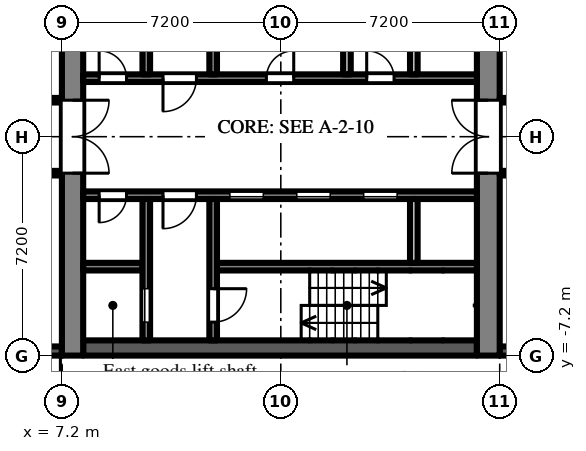
"""IFC4 building model, lengths in metres.
Left out: names, types, materials, properties, quantities, classifications, styles, units other than length and angle.
Written with IfcOpenShell. Run it as: python <this file> out.ifc"""

import sys

from ifc_helpers import new_model, si_unit, direction, frame, frame_2d, origin, place, context, subcontext, project, spatial, rectangle, extrude, element, fill, save


model = new_model("IFC4")
c1 = context("Model", 3, precision=1e-05, world=origin(), true_north=direction((0.0, 1.0)))
c2 = subcontext(c1, "Body", "Model", "MODEL_VIEW")
j1 = project(units=[si_unit("LENGTHUNIT", "METRE"), si_unit("PLANEANGLEUNIT", "RADIAN")], contexts=[c1])
p1 = place(None, origin())
s1 = spatial("IfcSite", under=j1, at=p1, CompositionType="ELEMENT")
p2 = place(p1, origin())
s2 = spatial("IfcBuilding", under=s1, at=p2, CompositionType="ELEMENT")
p3 = place(p2, frame((0.0, 0.0, 59.7)))
s3 = spatial("IfcBuildingStorey", under=s2, at=p3, CompositionType="ELEMENT", Elevation=59.7)
p4 = place(p3, frame((21.6, -7.05, 0.0), z_axis=(0.0, 0.0, 1.0), x_axis=(1.0, 0.0, 0.0)))
e1 = element("IfcWall", 1, at=p4, inside=s3, PredefinedType="SOLIDWALL", context=c2, shape_type="SweptSolid", body=[
    extrude(rectangle(XDim=2.7, YDim=0.3, at=frame_2d((1.35, 0.0))), origin(), (0.0, 0.0, 1.0), 2.1),
])
p5 = place(p4, frame((0.75, 0.0, 0.2)))
e2 = element("IfcOpeningElement", 2, at=p5, cuts=e1, PredefinedType="OPENING", context=c2, shape_type="SweptSolid", body=[
    extrude(rectangle(XDim=1.2, YDim=1.85, at=frame_2d((0.6, 0.925))), frame((0.0, 0.16, 0.0), z_axis=(0.0, -1.0, 0.0), x_axis=(1.0, 0.0, 0.0)), (0.0, 0.0, 1.0), 0.32),
])
p6 = place(p3, frame((4.2, -7.05, 0.0), z_axis=(0.0, 0.0, 1.0), x_axis=(1.0, 0.0, 0.0)))
e3 = element("IfcWall", 3, at=p6, inside=s3, PredefinedType="SOLIDWALL", context=c2, shape_type="SweptSolid", body=[
    extrude(rectangle(XDim=3.0, YDim=0.3, at=frame_2d((1.5, 0.0))), origin(), (0.0, 0.0, 1.0), 2.55),
])
p7 = place(p3, frame((7.55, -7.2, 0.0), z_axis=(0.0, 0.0, 1.0), x_axis=(0.0, 1.0, 0.0)))
e4 = element("IfcWall", 4, at=p7, inside=s3, PredefinedType="SHEAR", context=c2, shape_type="SweptSolid", body=[
    extrude(rectangle(XDim=14.4, YDim=0.7, at=frame_2d((7.2, 0.0))), origin(), (0.0, 0.0, 1.0), 2.55),
])
p8 = place(p7, frame((6.0, 0.0, 0.0)))
e5 = element("IfcOpeningElement", 5, at=p8, cuts=e4, PredefinedType="OPENING", context=c2, shape_type="SweptSolid", body=[
    extrude(rectangle(XDim=2.4, YDim=2.2, at=frame_2d((1.2, 1.1))), frame((0.0, 0.36, 0.0), z_axis=(0.0, -1.0, 0.0), x_axis=(1.0, 0.0, 0.0)), (0.0, 0.0, 1.0), 0.72),
])
p9 = place(p3, frame((21.225, -7.2, 0.0), z_axis=(0.0, 0.0, 1.0), x_axis=(0.0, 1.0, 0.0)))
e6 = element("IfcWall", 6, at=p9, inside=s3, PredefinedType="SHEAR", context=c2, shape_type="SweptSolid", body=[
    extrude(rectangle(XDim=14.4, YDim=0.75, at=frame_2d((7.2, 0.0))), origin(), (0.0, 0.0, 1.0), 2.55),
])
p10 = place(p9, frame((6.0, 0.0, 0.0)))
e7 = element("IfcOpeningElement", 7, at=p10, cuts=e6, PredefinedType="OPENING", context=c2, shape_type="SweptSolid", body=[
    extrude(rectangle(XDim=2.4, YDim=2.2, at=frame_2d((1.2, 1.1))), frame((0.0, 0.385, 0.0), z_axis=(0.0, -1.0, 0.0), x_axis=(1.0, 0.0, 0.0)), (0.0, 0.0, 1.0), 0.77),
])
p11 = place(p3, frame((7.9, 1.925, 0.0), z_axis=(0.0, 0.0, 1.0), x_axis=(1.0, 0.0, 0.0)))
e8 = element("IfcWall", 8, at=p11, inside=s3, PredefinedType="SHEAR", context=c2, shape_type="SweptSolid", body=[
    extrude(rectangle(XDim=12.95, YDim=0.25, at=frame_2d((6.475, 0.0))), origin(), (0.0, 0.0, 1.0), 2.55),
])
p12 = place(p11, frame((0.525, 0.0, 0.0)))
e9 = element("IfcOpeningElement", 9, at=p12, cuts=e8, PredefinedType="OPENING", context=c2, shape_type="SweptSolid", body=[
    extrude(rectangle(XDim=0.9, YDim=2.1, at=frame_2d((0.45, 1.05))), frame((0.0, 0.135, 0.0), z_axis=(0.0, -1.0, 0.0), x_axis=(1.0, 0.0, 0.0)), (0.0, 0.0, 1.0), 0.27),
])
p13 = place(p11, frame((2.625, 0.0, 0.0)))
e10 = element("IfcOpeningElement", 10, at=p13, cuts=e8, PredefinedType="OPENING", context=c2, shape_type="SweptSolid", body=[
    extrude(rectangle(XDim=1.1, YDim=2.1, at=frame_2d((0.55, 1.05))), frame((0.0, 0.135, 0.0), z_axis=(0.0, -1.0, 0.0), x_axis=(1.0, 0.0, 0.0)), (0.0, 0.0, 1.0), 0.27),
])
p14 = place(p11, frame((6.025, 0.0, 0.0)))
e11 = element("IfcOpeningElement", 11, at=p14, cuts=e8, PredefinedType="OPENING", context=c2, shape_type="SweptSolid", body=[
    extrude(rectangle(XDim=0.9, YDim=2.1, at=frame_2d((0.45, 1.05))), frame((0.0, 0.135, 0.0), z_axis=(0.0, -1.0, 0.0), x_axis=(1.0, 0.0, 0.0)), (0.0, 0.0, 1.0), 0.27),
])
p15 = place(p11, frame((9.325, 0.0, 0.0)))
e12 = element("IfcOpeningElement", 12, at=p15, cuts=e8, PredefinedType="OPENING", context=c2, shape_type="SweptSolid", body=[
    extrude(rectangle(XDim=0.9, YDim=2.1, at=frame_2d((0.45, 1.05))), frame((0.0, 0.135, 0.0), z_axis=(0.0, -1.0, 0.0), x_axis=(1.0, 0.0, 0.0)), (0.0, 0.0, 1.0), 0.27),
])
p16 = place(p3, frame((9.975, 2.05, 0.0), z_axis=(0.0, 0.0, 1.0), x_axis=(0.0, 1.0, 0.0)))
e13 = element("IfcWall", 13, at=p16, inside=s3, PredefinedType="SHEAR", context=c2, shape_type="SweptSolid", body=[
    extrude(rectangle(XDim=4.65, YDim=0.25, at=frame_2d((2.325, 0.0))), origin(), (0.0, 0.0, 1.0), 2.55),
])
p17 = place(p16, frame((2.95, 0.0, 0.0)))
e14 = element("IfcOpeningElement", 14, at=p17, cuts=e13, PredefinedType="OPENING", context=c2, shape_type="SweptSolid", body=[
    extrude(rectangle(XDim=1.1, YDim=2.1, at=frame_2d((0.55, 1.05))), frame((0.0, 0.135, 0.0), z_axis=(0.0, -1.0, 0.0), x_axis=(1.0, 0.0, 0.0)), (0.0, 0.0, 1.0), 0.27),
])
p18 = place(p3, frame((12.175, 2.05, 0.0), z_axis=(0.0, 0.0, 1.0), x_axis=(0.0, 1.0, 0.0)))
e15 = element("IfcWall", 15, at=p18, inside=s3, PredefinedType="SHEAR", context=c2, shape_type="SweptSolid", body=[
    extrude(rectangle(XDim=4.65, YDim=0.25, at=frame_2d((2.325, 0.0))), origin(), (0.0, 0.0, 1.0), 2.55),
])
p19 = place(p18, frame((2.95, 0.0, 0.0)))
e16 = element("IfcOpeningElement", 16, at=p19, cuts=e15, PredefinedType="OPENING", context=c2, shape_type="SweptSolid", body=[
    extrude(rectangle(XDim=1.1, YDim=2.1, at=frame_2d((0.55, 1.05))), frame((0.0, 0.135, 0.0), z_axis=(0.0, -1.0, 0.0), x_axis=(1.0, 0.0, 0.0)), (0.0, 0.0, 1.0), 0.27),
])
for number, where, z_axis, x_axis in (
    (17, (16.575, 2.05, 0.0), (0.0, 0.0, 1.0), (0.0, 1.0, 0.0)),
    (18, (18.775, 2.05, 0.0), (0.0, 0.0, 1.0), (0.0, 1.0, 0.0)),
):
    element("IfcWall", number, at=place(p3, frame(where, z_axis=z_axis, x_axis=x_axis)), inside=s3, PredefinedType="PARTITIONING", context=c2, shape_type="SweptSolid", body=[
        extrude(rectangle(XDim=2.1, YDim=0.25, at=frame_2d((1.05, 0.0))), origin(), (0.0, 0.0, 1.0), 2.55),
    ])
p20 = place(p3, frame((7.9, -6.95, 0.0), z_axis=(0.0, 0.0, 1.0), x_axis=(1.0, 0.0, 0.0)))
e19 = element("IfcWall", 19, at=p20, inside=s3, PredefinedType="SHEAR", context=c2, shape_type="SweptSolid", body=[
    extrude(rectangle(XDim=12.95, YDim=0.5, at=frame_2d((6.475, 0.0))), origin(), (0.0, 0.0, 1.0), 2.55),
])
p21 = place(p3, frame((7.9, -1.925, 0.0), z_axis=(0.0, 0.0, 1.0), x_axis=(1.0, 0.0, 0.0)))
e20 = element("IfcWall", 20, at=p21, inside=s3, PredefinedType="SHEAR", context=c2, shape_type="SweptSolid", body=[
    extrude(rectangle(XDim=12.95, YDim=0.25, at=frame_2d((6.475, 0.0))), origin(), (0.0, 0.0, 1.0), 2.55),
])
p22 = place(p21, frame((4.825, 0.0, 0.0)))
e21 = element("IfcOpeningElement", 21, at=p22, cuts=e20, PredefinedType="OPENING", context=c2, shape_type="SweptSolid", body=[
    extrude(rectangle(XDim=1.1, YDim=2.1, at=frame_2d((0.55, 1.05))), frame((0.0, 0.135, 0.0), z_axis=(0.0, -1.0, 0.0), x_axis=(1.0, 0.0, 0.0)), (0.0, 0.0, 1.0), 0.27),
])
p23 = place(p21, frame((7.025, 0.0, 0.0)))
e22 = element("IfcOpeningElement", 22, at=p23, cuts=e20, PredefinedType="OPENING", context=c2, shape_type="SweptSolid", body=[
    extrude(rectangle(XDim=1.1, YDim=2.1, at=frame_2d((0.55, 1.05))), frame((0.0, 0.135, 0.0), z_axis=(0.0, -1.0, 0.0), x_axis=(1.0, 0.0, 0.0)), (0.0, 0.0, 1.0), 0.27),
])
p24 = place(p21, frame((9.225, 0.0, 0.0)))
e23 = element("IfcOpeningElement", 23, at=p24, cuts=e20, PredefinedType="OPENING", context=c2, shape_type="SweptSolid", body=[
    extrude(rectangle(XDim=1.1, YDim=2.1, at=frame_2d((0.55, 1.05))), frame((0.0, 0.135, 0.0), z_axis=(0.0, -1.0, 0.0), x_axis=(1.0, 0.0, 0.0)), (0.0, 0.0, 1.0), 0.27),
])
p25 = place(p21, frame((0.525, 0.0, 0.0)))
e24 = element("IfcOpeningElement", 24, at=p25, cuts=e20, PredefinedType="OPENING", context=c2, shape_type="SweptSolid", body=[
    extrude(rectangle(XDim=0.9, YDim=2.1, at=frame_2d((0.45, 1.05))), frame((0.0, 0.135, 0.0), z_axis=(0.0, -1.0, 0.0), x_axis=(1.0, 0.0, 0.0)), (0.0, 0.0, 1.0), 0.27),
])
p26 = place(p21, frame((2.625, 0.0, 0.0)))
e25 = element("IfcOpeningElement", 25, at=p26, cuts=e20, PredefinedType="OPENING", context=c2, shape_type="SweptSolid", body=[
    extrude(rectangle(XDim=1.1, YDim=2.1, at=frame_2d((0.55, 1.05))), frame((0.0, 0.135, 0.0), z_axis=(0.0, -1.0, 0.0), x_axis=(1.0, 0.0, 0.0)), (0.0, 0.0, 1.0), 0.27),
])
p27 = place(p3, frame((7.9, -4.275, 0.0), z_axis=(0.0, 0.0, 1.0), x_axis=(1.0, 0.0, 0.0)))
e26 = element("IfcWall", 26, at=p27, inside=s3, PredefinedType="SHEAR", context=c2, shape_type="SweptSolid", body=[
    extrude(rectangle(XDim=1.95, YDim=0.25, at=frame_2d((0.975, 0.0))), origin(), (0.0, 0.0, 1.0), 2.55),
])
p28 = place(p3, frame((12.3, -4.275, 0.0), z_axis=(0.0, 0.0, 1.0), x_axis=(1.0, 0.0, 0.0)))
e27 = element("IfcWall", 27, at=p28, inside=s3, PredefinedType="SHEAR", context=c2, shape_type="SweptSolid", body=[
    extrude(rectangle(XDim=8.55, YDim=0.25, at=frame_2d((4.275, 0.0))), origin(), (0.0, 0.0, 1.0), 2.55),
])
p29 = place(p3, frame((9.975, -2.05, 0.0), z_axis=(0.0, 0.0, 1.0), x_axis=(0.0, -1.0, 0.0)))
e28 = element("IfcWall", 28, at=p29, inside=s3, PredefinedType="SHEAR", context=c2, shape_type="SweptSolid", body=[
    extrude(rectangle(XDim=4.65, YDim=0.25, at=frame_2d((2.325, 0.0))), origin(), (0.0, 0.0, 1.0), 2.55),
])
p30 = place(p29, frame((2.95, 0.0, 0.0)))
e29 = element("IfcOpeningElement", 29, at=p30, cuts=e28, PredefinedType="OPENING", context=c2, shape_type="SweptSolid", body=[
    extrude(rectangle(XDim=1.1, YDim=2.1, at=frame_2d((0.55, 1.05))), frame((0.0, 0.135, 0.0), z_axis=(0.0, -1.0, 0.0), x_axis=(1.0, 0.0, 0.0)), (0.0, 0.0, 1.0), 0.27),
])
p31 = place(p3, frame((12.175, -2.05, 0.0), z_axis=(0.0, 0.0, 1.0), x_axis=(0.0, -1.0, 0.0)))
e30 = element("IfcWall", 30, at=p31, inside=s3, PredefinedType="SHEAR", context=c2, shape_type="SweptSolid", body=[
    extrude(rectangle(XDim=4.65, YDim=0.25, at=frame_2d((2.325, 0.0))), origin(), (0.0, 0.0, 1.0), 2.55),
])
p32 = place(p31, frame((2.95, 0.0, 0.0)))
e31 = element("IfcOpeningElement", 31, at=p32, cuts=e30, PredefinedType="OPENING", context=c2, shape_type="SweptSolid", body=[
    extrude(rectangle(XDim=1.1, YDim=2.1, at=frame_2d((0.55, 1.05))), frame((0.0, 0.135, 0.0), z_axis=(0.0, -1.0, 0.0), x_axis=(1.0, 0.0, 0.0)), (0.0, 0.0, 1.0), 0.27),
])
p33 = place(p3, frame((18.775, -2.05, 0.0), z_axis=(0.0, 0.0, 1.0), x_axis=(0.0, -1.0, 0.0)))
e32 = element("IfcWall", 32, at=p33, inside=s3, PredefinedType="PARTITIONING", context=c2, shape_type="SweptSolid", body=[
    extrude(rectangle(XDim=2.1, YDim=0.25, at=frame_2d((1.05, 0.0))), origin(), (0.0, 0.0, 1.0), 2.55),
])
p34 = place(p3, frame((1.275, -1.2, 0.0), z_axis=(0.0, 0.0, 1.0), x_axis=(1.0, 0.0, 0.0)))
e33 = element("IfcWall", 33, at=p34, inside=s3, PredefinedType="PARTITIONING", context=c2, shape_type="SweptSolid", body=[
    extrude(rectangle(XDim=5.925, YDim=0.15, at=frame_2d((2.962, 0.0))), origin(), (0.0, 0.0, 1.0), 2.55),
])
p35 = place(p34, frame((3.075, 0.0, 0.0)))
e34 = element("IfcOpeningElement", 34, at=p35, cuts=e33, PredefinedType="OPENING", context=c2, shape_type="SweptSolid", body=[
    extrude(rectangle(XDim=0.9, YDim=2.1, at=frame_2d((0.45, 1.05))), frame((0.0, 0.085, 0.0), z_axis=(0.0, -1.0, 0.0), x_axis=(1.0, 0.0, 0.0)), (0.0, 0.0, 1.0), 0.17),
])
p36 = place(p3, frame((1.275, 1.2, 0.0), z_axis=(0.0, 0.0, 1.0), x_axis=(1.0, 0.0, 0.0)))
e35 = element("IfcWall", 35, at=p36, inside=s3, PredefinedType="PARTITIONING", context=c2, shape_type="SweptSolid", body=[
    extrude(rectangle(XDim=5.925, YDim=0.15, at=frame_2d((2.962, 0.0))), origin(), (0.0, 0.0, 1.0), 2.55),
])
p37 = place(p36, frame((4.475, 0.0, 0.0)))
e36 = element("IfcOpeningElement", 36, at=p37, cuts=e35, PredefinedType="OPENING", context=c2, shape_type="SweptSolid", body=[
    extrude(rectangle(XDim=0.9, YDim=2.1, at=frame_2d((0.45, 1.05))), frame((0.0, 0.085, 0.0), z_axis=(0.0, -1.0, 0.0), x_axis=(1.0, 0.0, 0.0)), (0.0, 0.0, 1.0), 0.17),
])
p38 = place(p3, frame((21.6, -1.2, 0.0), z_axis=(0.0, 0.0, 1.0), x_axis=(1.0, 0.0, 0.0)))
e37 = element("IfcWall", 37, at=p38, inside=s3, PredefinedType="PARTITIONING", context=c2, shape_type="SweptSolid", body=[
    extrude(rectangle(XDim=14.9, YDim=0.15, at=frame_2d((7.45, 0.0))), origin(), (0.0, 0.0, 1.0), 2.55),
])
p39 = place(p38, frame((3.8, 0.0, 0.0)))
e38 = element("IfcOpeningElement", 38, at=p39, cuts=e37, PredefinedType="OPENING", context=c2, shape_type="SweptSolid", body=[
    extrude(rectangle(XDim=1.0, YDim=2.1, at=frame_2d((0.5, 1.05))), frame((0.0, 0.085, 0.0), z_axis=(0.0, -1.0, 0.0), x_axis=(1.0, 0.0, 0.0)), (0.0, 0.0, 1.0), 0.17),
])
p40 = place(p38, frame((9.2, 0.0, 0.0)))
e39 = element("IfcOpeningElement", 39, at=p40, cuts=e37, PredefinedType="OPENING", context=c2, shape_type="SweptSolid", body=[
    extrude(rectangle(XDim=1.0, YDim=2.1, at=frame_2d((0.5, 1.05))), frame((0.0, 0.085, 0.0), z_axis=(0.0, -1.0, 0.0), x_axis=(1.0, 0.0, 0.0)), (0.0, 0.0, 1.0), 0.17),
])
p41 = place(p38, frame((11.95, 0.0, 0.0)))
e40 = element("IfcOpeningElement", 40, at=p41, cuts=e37, PredefinedType="OPENING", context=c2, shape_type="SweptSolid", body=[
    extrude(rectangle(XDim=1.8, YDim=2.1, at=frame_2d((0.9, 1.05))), frame((0.0, 0.085, 0.0), z_axis=(0.0, -1.0, 0.0), x_axis=(1.0, 0.0, 0.0)), (0.0, 0.0, 1.0), 0.17),
])
p42 = place(p3, frame((21.6, 1.2, 0.0), z_axis=(0.0, 0.0, 1.0), x_axis=(1.0, 0.0, 0.0)))
e41 = element("IfcWall", 41, at=p42, inside=s3, PredefinedType="PARTITIONING", context=c2, shape_type="SweptSolid", body=[
    extrude(rectangle(XDim=14.9, YDim=0.15, at=frame_2d((7.45, 0.0))), origin(), (0.0, 0.0, 1.0), 2.55),
])
p43 = place(p42, frame((6.0, 0.0, 0.0)))
e42 = element("IfcOpeningElement", 42, at=p43, cuts=e41, PredefinedType="OPENING", context=c2, shape_type="SweptSolid", body=[
    extrude(rectangle(XDim=1.0, YDim=2.1, at=frame_2d((0.5, 1.05))), frame((0.0, 0.085, 0.0), z_axis=(0.0, -1.0, 0.0), x_axis=(1.0, 0.0, 0.0)), (0.0, 0.0, 1.0), 0.17),
])
p44 = place(p42, frame((7.65, 0.0, 0.0)))
e43 = element("IfcOpeningElement", 43, at=p44, cuts=e41, PredefinedType="OPENING", context=c2, shape_type="SweptSolid", body=[
    extrude(rectangle(XDim=0.9, YDim=2.1, at=frame_2d((0.45, 1.05))), frame((0.0, 0.085, 0.0), z_axis=(0.0, -1.0, 0.0), x_axis=(1.0, 0.0, 0.0)), (0.0, 0.0, 1.0), 0.17),
])
p45 = place(p42, frame((9.45, 0.0, 0.0)))
e44 = element("IfcOpeningElement", 44, at=p45, cuts=e41, PredefinedType="OPENING", context=c2, shape_type="SweptSolid", body=[
    extrude(rectangle(XDim=0.9, YDim=2.1, at=frame_2d((0.45, 1.05))), frame((0.0, 0.085, 0.0), z_axis=(0.0, -1.0, 0.0), x_axis=(1.0, 0.0, 0.0)), (0.0, 0.0, 1.0), 0.17),
])
p46 = place(p42, frame((11.95, 0.0, 0.0)))
e45 = element("IfcOpeningElement", 45, at=p46, cuts=e41, PredefinedType="OPENING", context=c2, shape_type="SweptSolid", body=[
    extrude(rectangle(XDim=1.8, YDim=2.1, at=frame_2d((0.9, 1.05))), frame((0.0, 0.085, 0.0), z_axis=(0.0, -1.0, 0.0), x_axis=(1.0, 0.0, 0.0)), (0.0, 0.0, 1.0), 0.17),
])
p47 = place(p22, origin())
e46 = element("IfcDoor", 46, at=p47, inside=s3, OperationType="SLIDING_TO_LEFT", PredefinedType="DOOR", context=c2, shape_type="SweptSolid", body=[
    extrude(rectangle(XDim=1.1, YDim=2.1, at=frame_2d((0.55, 1.05))), frame((0.0, 0.025, 0.0), z_axis=(0.0, -1.0, 0.0), x_axis=(1.0, 0.0, 0.0)), (0.0, 0.0, 1.0), 0.05),
])
fill(e21, e46)
p48 = place(p23, origin())
e47 = element("IfcDoor", 47, at=p48, inside=s3, OperationType="SLIDING_TO_LEFT", PredefinedType="DOOR", context=c2, shape_type="SweptSolid", body=[
    extrude(rectangle(XDim=1.1, YDim=2.1, at=frame_2d((0.55, 1.05))), frame((0.0, 0.025, 0.0), z_axis=(0.0, -1.0, 0.0), x_axis=(1.0, 0.0, 0.0)), (0.0, 0.0, 1.0), 0.05),
])
fill(e22, e47)
p49 = place(p24, origin())
e48 = element("IfcDoor", 48, at=p49, inside=s3, OperationType="SLIDING_TO_LEFT", PredefinedType="DOOR", context=c2, shape_type="SweptSolid", body=[
    extrude(rectangle(XDim=1.1, YDim=2.1, at=frame_2d((0.55, 1.05))), frame((0.0, 0.025, 0.0), z_axis=(0.0, -1.0, 0.0), x_axis=(1.0, 0.0, 0.0)), (0.0, 0.0, 1.0), 0.05),
])
fill(e23, e48)
p50 = place(p30, origin())
e49 = element("IfcDoor", 49, at=p50, inside=s3, OperationType="SLIDING_TO_LEFT", PredefinedType="DOOR", context=c2, shape_type="SweptSolid", body=[
    extrude(rectangle(XDim=1.1, YDim=2.1, at=frame_2d((0.55, 1.05))), frame((0.0, 0.025, 0.0), z_axis=(0.0, -1.0, 0.0), x_axis=(1.0, 0.0, 0.0)), (0.0, 0.0, 1.0), 0.05),
])
fill(e29, e49)
p51 = place(p32, origin())
e50 = element("IfcDoor", 50, at=p51, inside=s3, OperationType="SINGLE_SWING_LEFT", PredefinedType="DOOR", context=c2, shape_type="SweptSolid", body=[
    extrude(rectangle(XDim=1.1, YDim=2.1, at=frame_2d((0.55, 1.05))), frame((0.0, 0.025, 0.0), z_axis=(0.0, -1.0, 0.0), x_axis=(1.0, 0.0, 0.0)), (0.0, 0.0, 1.0), 0.05),
])
fill(e31, e50)
p52 = place(p12, origin())
e51 = element("IfcDoor", 51, at=p52, inside=s3, OperationType="SINGLE_SWING_LEFT", PredefinedType="DOOR", context=c2, shape_type="SweptSolid", body=[
    extrude(rectangle(XDim=0.9, YDim=2.1, at=frame_2d((0.45, 1.05))), frame((0.0, 0.025, 0.0), z_axis=(0.0, -1.0, 0.0), x_axis=(1.0, 0.0, 0.0)), (0.0, 0.0, 1.0), 0.05),
])
fill(e9, e51)
p53 = place(p25, frame((0.9, 0.0, 0.0), z_axis=(0.0, 0.0, 1.0), x_axis=(-1.0, 0.0, 0.0)))
e52 = element("IfcDoor", 52, at=p53, inside=s3, OperationType="SINGLE_SWING_RIGHT", PredefinedType="DOOR", context=c2, shape_type="SweptSolid", body=[
    extrude(rectangle(XDim=0.9, YDim=2.1, at=frame_2d((0.45, 1.05))), frame((0.0, 0.025, 0.0), z_axis=(0.0, -1.0, 0.0), x_axis=(1.0, 0.0, 0.0)), (0.0, 0.0, 1.0), 0.05),
])
fill(e24, e52)
p54 = place(p13, frame((1.1, 0.0, 0.0), z_axis=(0.0, 0.0, 1.0), x_axis=(-1.0, 0.0, 0.0)))
e53 = element("IfcDoor", 53, at=p54, inside=s3, OperationType="SINGLE_SWING_RIGHT", PredefinedType="DOOR", context=c2, shape_type="SweptSolid", body=[
    extrude(rectangle(XDim=1.1, YDim=2.1, at=frame_2d((0.55, 1.05))), frame((0.0, 0.025, 0.0), z_axis=(0.0, -1.0, 0.0), x_axis=(1.0, 0.0, 0.0)), (0.0, 0.0, 1.0), 0.05),
])
fill(e10, e53)
p55 = place(p26, frame((1.1, 0.0, 0.0), z_axis=(0.0, 0.0, 1.0), x_axis=(-1.0, 0.0, 0.0)))
e54 = element("IfcDoor", 54, at=p55, inside=s3, OperationType="SINGLE_SWING_RIGHT", PredefinedType="DOOR", context=c2, shape_type="SweptSolid", body=[
    extrude(rectangle(XDim=1.1, YDim=2.1, at=frame_2d((0.55, 1.05))), frame((0.0, 0.025, 0.0), z_axis=(0.0, -1.0, 0.0), x_axis=(1.0, 0.0, 0.0)), (0.0, 0.0, 1.0), 0.05),
])
fill(e25, e54)
p56 = place(p8, frame((2.4, 0.0, 0.0), z_axis=(0.0, 0.0, 1.0), x_axis=(-1.0, 0.0, 0.0)))
e55 = element("IfcDoor", 55, at=p56, inside=s3, OperationType="DOUBLE_DOOR_DOUBLE_SWING", PredefinedType="DOOR", context=c2, shape_type="SweptSolid", body=[
    extrude(rectangle(XDim=2.4, YDim=2.2, at=frame_2d((1.2, 1.1))), frame((0.0, 0.025, 0.0), z_axis=(0.0, -1.0, 0.0), x_axis=(1.0, 0.0, 0.0)), (0.0, 0.0, 1.0), 0.05),
])
fill(e5, e55)
p57 = place(p10, origin())
e56 = element("IfcDoor", 56, at=p57, inside=s3, OperationType="DOUBLE_DOOR_DOUBLE_SWING", PredefinedType="DOOR", context=c2, shape_type="SweptSolid", body=[
    extrude(rectangle(XDim=2.4, YDim=2.2, at=frame_2d((1.2, 1.1))), frame((0.0, 0.025, 0.0), z_axis=(0.0, -1.0, 0.0), x_axis=(1.0, 0.0, 0.0)), (0.0, 0.0, 1.0), 0.05),
])
fill(e7, e56)
p58 = place(p14, origin())
e57 = element("IfcDoor", 57, at=p58, inside=s3, OperationType="SINGLE_SWING_RIGHT", PredefinedType="DOOR", context=c2, shape_type="SweptSolid", body=[
    extrude(rectangle(XDim=0.9, YDim=2.1, at=frame_2d((0.45, 1.05))), frame((0.0, 0.025, 0.0), z_axis=(0.0, -1.0, 0.0), x_axis=(1.0, 0.0, 0.0)), (0.0, 0.0, 1.0), 0.05),
])
fill(e11, e57)
p59 = place(p15, origin())
e58 = element("IfcDoor", 58, at=p59, inside=s3, OperationType="SINGLE_SWING_LEFT", PredefinedType="DOOR", context=c2, shape_type="SweptSolid", body=[
    extrude(rectangle(XDim=0.9, YDim=2.1, at=frame_2d((0.45, 1.05))), frame((0.0, 0.025, 0.0), z_axis=(0.0, -1.0, 0.0), x_axis=(1.0, 0.0, 0.0)), (0.0, 0.0, 1.0), 0.05),
])
fill(e12, e58)
save(model, sys.argv[1])
